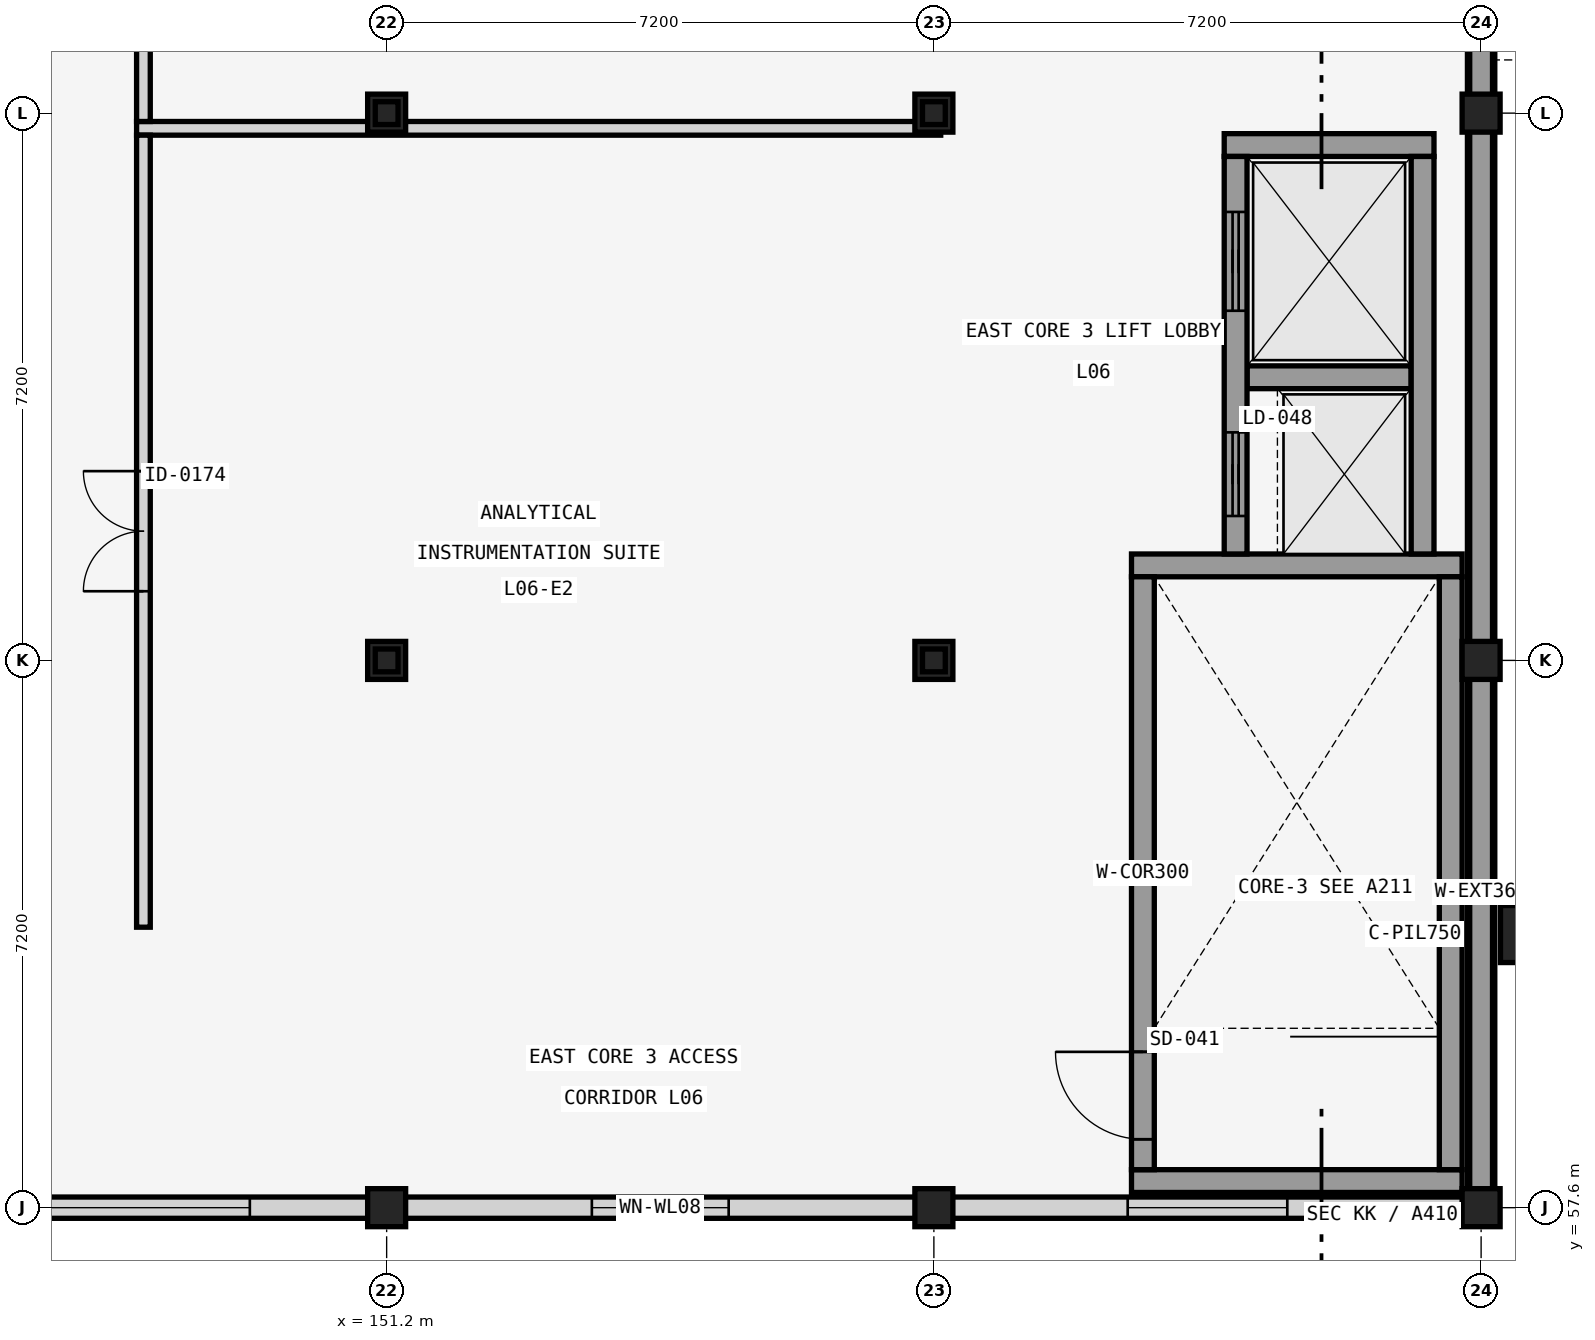
"""IFC4 building model, lengths in metres.
Left out: names, types, materials, properties, quantities, classifications, styles, units other than length and angle.
Written with IfcOpenShell. Run it as: python <this file> out.ifc"""

import sys

from ifc_helpers import new_model, si_unit, direction, frame, frame_2d, origin, origin_2d, place, context, subcontext, project, spatial, polyline, rectangle, i_section, outline, extrude, element, fill, save


model = new_model("IFC4")
c1 = context("Model", 3, precision=1e-05, world=origin(), true_north=direction((0.0, 1.0)))
c2 = subcontext(c1, "Body", "Model", "MODEL_VIEW")
j1 = project(units=[si_unit("LENGTHUNIT", "METRE"), si_unit("PLANEANGLEUNIT", "RADIAN")], contexts=[c1])
p1 = place(None, origin())
s1 = spatial("IfcSite", under=j1, at=p1, CompositionType="ELEMENT")
p2 = place(p1, origin())
s2 = spatial("IfcBuilding", under=s1, at=p2, CompositionType="ELEMENT")
p3 = place(p2, frame((0.0, 0.0, 25.6)))
s3 = spatial("IfcBuildingStorey", under=s2, at=p3, CompositionType="ELEMENT", Elevation=25.6)
for number, where, z_axis, x_axis in (
    (1, (151.2, 57.6, 0.0), (0.0, 0.0, 1.0), (1.0, 0.0, 0.0)),
    (2, (151.2, 64.8, 0.0), (0.0, 0.0, 1.0), (1.0, 0.0, 0.0)),
    (3, (151.2, 72.0, 0.0), (0.0, 0.0, 1.0), (1.0, 0.0, 0.0)),
    (4, (158.4, 57.6, 0.0), (0.0, 0.0, 1.0), (1.0, 0.0, 0.0)),
    (5, (158.4, 64.8, 0.0), (0.0, 0.0, 1.0), (1.0, 0.0, 0.0)),
    (6, (158.4, 72.0, 0.0), (0.0, 0.0, 1.0), (1.0, 0.0, 0.0)),
    (7, (165.6, 57.6, 0.0), (0.0, 0.0, 1.0), (1.0, 0.0, 0.0)),
    (8, (165.6, 64.8, 0.0), (0.0, 0.0, 1.0), (1.0, 0.0, 0.0)),
    (9, (165.6, 72.0, 0.0), (0.0, 0.0, 1.0), (1.0, 0.0, 0.0)),
):
    element("IfcColumn", number, at=place(p3, frame(where, z_axis=z_axis, x_axis=x_axis)), inside=s3, PredefinedType="COLUMN", context=c2, shape_type="SweptSolid", body=[
        extrude(rectangle(XDim=0.5, YDim=0.5, at=origin_2d()), origin(), (0.0, 0.0, 1.0), 4.16),
    ])
p4 = place(p3, frame((166.08, 61.2, 0.0), z_axis=(0.0, 0.0, 1.0), x_axis=(1.0, 0.0, 0.0)))
e10 = element("IfcColumn", 10, at=p4, inside=s3, PredefinedType="PILASTER", context=c2, shape_type="SweptSolid", body=[
    extrude(rectangle(XDim=0.45, YDim=0.75, at=origin_2d()), origin(), (0.0, 0.0, 1.0), 4.16),
])
p5 = place(p3, frame((151.2, 64.8, 4.16), z_axis=(0.0, 0.0, 1.0), x_axis=(1.0, 0.0, 0.0)))
e11 = element("IfcColumn", 11, at=p5, inside=s3, PredefinedType="COLUMN", context=c2, shape_type="SweptSolid", body=[
    extrude(i_section(OverallWidth=0.3, OverallDepth=0.3, WebThickness=0.011, FlangeThickness=0.019, FilletRadius=0.027, at=origin_2d()), origin(), (0.0, 0.0, 1.0), 0.5),
])
p6 = place(p3, frame((151.2, 72.0, 4.16), z_axis=(0.0, 0.0, 1.0), x_axis=(1.0, 0.0, 0.0)))
e12 = element("IfcColumn", 12, at=p6, inside=s3, PredefinedType="COLUMN", context=c2, shape_type="SweptSolid", body=[
    extrude(i_section(OverallWidth=0.3, OverallDepth=0.3, WebThickness=0.011, FlangeThickness=0.019, FilletRadius=0.027, at=origin_2d()), origin(), (0.0, 0.0, 1.0), 1.28),
])
p7 = place(p3, frame((158.4, 64.8, 4.16), z_axis=(0.0, 0.0, 1.0), x_axis=(1.0, 0.0, 0.0)))
e13 = element("IfcColumn", 13, at=p7, inside=s3, PredefinedType="COLUMN", context=c2, shape_type="SweptSolid", body=[
    extrude(i_section(OverallWidth=0.3, OverallDepth=0.3, WebThickness=0.011, FlangeThickness=0.019, FilletRadius=0.027, at=origin_2d()), origin(), (0.0, 0.0, 1.0), 0.5),
])
p8 = place(p3, frame((158.4, 72.0, 4.16), z_axis=(0.0, 0.0, 1.0), x_axis=(1.0, 0.0, 0.0)))
e14 = element("IfcColumn", 14, at=p8, inside=s3, PredefinedType="COLUMN", context=c2, shape_type="SweptSolid", body=[
    extrude(i_section(OverallWidth=0.3, OverallDepth=0.3, WebThickness=0.011, FlangeThickness=0.019, FilletRadius=0.027, at=origin_2d()), origin(), (0.0, 0.0, 1.0), 1.28),
])
for number, where, z_axis, x_axis in (
    (15, (165.6, 57.84, 0.0), (0.0, 0.0, 1.0), (0.0, 1.0, 0.0)),
    (16, (165.6, 65.04, 0.0), (0.0, 0.0, 1.0), (0.0, 1.0, 0.0)),
):
    element("IfcWall", number, at=place(p3, frame(where, z_axis=z_axis, x_axis=x_axis)), inside=s3, PredefinedType="SOLIDWALL", context=c2, shape_type="SweptSolid", body=[
        extrude(rectangle(XDim=6.72, YDim=0.36, at=frame_2d((3.36, 0.0))), origin(), (0.0, 0.0, 1.0), 3.55),
    ])
p9 = place(p3, frame((165.6, 72.24, 0.0), z_axis=(0.0, 0.0, 1.0), x_axis=(0.0, 1.0, 0.0)))
e17 = element("IfcWall", 17, at=p9, inside=s3, PredefinedType="SOLIDWALL", context=c2, shape_type="SweptSolid", body=[
    extrude(rectangle(XDim=6.72, YDim=0.36, at=frame_2d((3.36, 0.0))), origin(), (0.0, 0.0, 1.0), 3.55),
])
p10 = place(p9, frame((2.31, 0.0, 0.68)))
e18 = element("IfcOpeningElement", 18, at=p10, cuts=e17, PredefinedType="OPENING", context=c2, shape_type="SweptSolid", body=[
    extrude(rectangle(XDim=2.1, YDim=1.8, at=frame_2d((1.05, 0.9))), frame((0.0, 0.19, 0.0), z_axis=(0.0, -1.0, 0.0), x_axis=(1.0, 0.0, 0.0)), (0.0, 0.0, 1.0), 0.38),
])
p11 = place(p3, frame((144.24, 57.6, 0.0), z_axis=(0.0, 0.0, 1.0), x_axis=(1.0, 0.0, 0.0)))
e19 = element("IfcWall", 19, at=p11, inside=s3, PredefinedType="SOLIDWALL", context=c2, shape_type="SweptSolid", body=[
    extrude(rectangle(XDim=6.72, YDim=0.28, at=frame_2d((3.36, 0.0))), origin(), (0.0, 0.0, 1.0), 3.55),
])
p12 = place(p11, frame((1.56, 0.0, 0.68)))
e20 = element("IfcOpeningElement", 20, at=p12, cuts=e19, PredefinedType="OPENING", context=c2, shape_type="SweptSolid", body=[
    extrude(rectangle(XDim=3.6, YDim=2.1, at=frame_2d((1.8, 1.05))), frame((0.0, 0.15, 0.0), z_axis=(0.0, -1.0, 0.0), x_axis=(1.0, 0.0, 0.0)), (0.0, 0.0, 1.0), 0.3),
])
p13 = place(p3, frame((151.44, 57.6, 0.0), z_axis=(0.0, 0.0, 1.0), x_axis=(1.0, 0.0, 0.0)))
e21 = element("IfcWall", 21, at=p13, inside=s3, PredefinedType="SOLIDWALL", context=c2, shape_type="SweptSolid", body=[
    extrude(rectangle(XDim=6.72, YDim=0.28, at=frame_2d((3.36, 0.0))), origin(), (0.0, 0.0, 1.0), 3.55),
])
p14 = place(p13, frame((2.46, 0.0, 0.68)))
e22 = element("IfcOpeningElement", 22, at=p14, cuts=e21, PredefinedType="OPENING", context=c2, shape_type="SweptSolid", body=[
    extrude(rectangle(XDim=1.8, YDim=1.8, at=frame_2d((0.9, 0.9))), frame((0.0, 0.15, 0.0), z_axis=(0.0, -1.0, 0.0), x_axis=(1.0, 0.0, 0.0)), (0.0, 0.0, 1.0), 0.3),
])
p15 = place(p3, frame((158.64, 57.6, 0.0), z_axis=(0.0, 0.0, 1.0), x_axis=(1.0, 0.0, 0.0)))
e23 = element("IfcWall", 23, at=p15, inside=s3, PredefinedType="SOLIDWALL", context=c2, shape_type="SweptSolid", body=[
    extrude(rectangle(XDim=6.72, YDim=0.28, at=frame_2d((3.36, 0.0))), origin(), (0.0, 0.0, 1.0), 3.55),
])
p16 = place(p15, frame((2.31, 0.0, 0.68)))
e24 = element("IfcOpeningElement", 24, at=p16, cuts=e23, PredefinedType="OPENING", context=c2, shape_type="SweptSolid", body=[
    extrude(rectangle(XDim=2.1, YDim=1.8, at=frame_2d((1.05, 0.9))), frame((0.0, 0.15, 0.0), z_axis=(0.0, -1.0, 0.0), x_axis=(1.0, 0.0, 0.0)), (0.0, 0.0, 1.0), 0.3),
])
p17 = place(p3, frame((165.6, 57.6, 4.16), z_axis=(0.0, 0.0, 1.0), x_axis=(0.0, 1.0, 0.0)))
e25 = element("IfcWall", 25, at=p17, inside=s3, PredefinedType="SHEAR", context=c2, shape_type="SweptSolid", body=[
    extrude(outline(polyline([(0.0, 0.0), (28.8, 0.0), (28.8, 0.12), (28.76, 3.12), (0.0, 0.12), (0.0, 0.0)])), frame((0.0, 0.15, 0.0), z_axis=(0.0, -1.0, 0.0), x_axis=(1.0, 0.0, 0.0)), (0.0, 0.0, 1.0), 0.3),
])
for number, where, z_axis, x_axis in (
    (26, (161.0, 57.95, 0.0), (0.0, 0.0, 1.0), (1.0, 0.0, 0.0)),
    (27, (161.0, 66.05, 0.0), (0.0, 0.0, 1.0), (1.0, 0.0, 0.0)),
):
    element("IfcWall", number, at=place(p3, frame(where, z_axis=z_axis, x_axis=x_axis)), inside=s3, PredefinedType="SHEAR", context=c2, shape_type="SweptSolid", body=[
        extrude(rectangle(XDim=4.35, YDim=0.3, at=frame_2d((2.175, 0.0))), origin(), (0.0, 0.0, 1.0), 3.81),
    ])
p18 = place(p3, frame((161.15, 58.1, 0.0), z_axis=(0.0, 0.0, 1.0), x_axis=(0.0, 1.0, 0.0)))
e28 = element("IfcWall", 28, at=p18, inside=s3, PredefinedType="SHEAR", context=c2, shape_type="SweptSolid", body=[
    extrude(rectangle(XDim=7.8, YDim=0.3, at=frame_2d((3.9, 0.0))), origin(), (0.0, 0.0, 1.0), 3.81),
])
p19 = place(p18, frame((0.4, 0.0, 0.0)))
e29 = element("IfcOpeningElement", 29, at=p19, cuts=e28, PredefinedType="OPENING", context=c2, shape_type="SweptSolid", body=[
    extrude(rectangle(XDim=1.15, YDim=2.2, at=frame_2d((0.575, 1.1))), frame((0.0, 0.16, 0.0), z_axis=(0.0, -1.0, 0.0), x_axis=(1.0, 0.0, 0.0)), (0.0, 0.0, 1.0), 0.32),
])
p20 = place(p3, frame((165.2, 58.1, 0.0), z_axis=(0.0, 0.0, 1.0), x_axis=(0.0, 1.0, 0.0)))
e30 = element("IfcWall", 30, at=p20, inside=s3, PredefinedType="SHEAR", context=c2, shape_type="SweptSolid", body=[
    extrude(rectangle(XDim=7.8, YDim=0.3, at=frame_2d((3.9, 0.0))), origin(), (0.0, 0.0, 1.0), 3.81),
])
p21 = place(p3, frame((162.22, 71.58, 0.0), z_axis=(0.0, 0.0, 1.0), x_axis=(1.0, 0.0, 0.0)))
e31 = element("IfcWall", 31, at=p21, inside=s3, PredefinedType="SHEAR", context=c2, shape_type="SweptSolid", body=[
    extrude(rectangle(XDim=2.76, YDim=0.3, at=frame_2d((1.38, 0.0))), origin(), (0.0, 0.0, 1.0), 3.81),
])
p22 = place(p3, frame((162.52, 68.525, 0.0), z_axis=(0.0, 0.0, 1.0), x_axis=(1.0, 0.0, 0.0)))
e32 = element("IfcWall", 32, at=p22, inside=s3, PredefinedType="SHEAR", context=c2, shape_type="SweptSolid", body=[
    extrude(rectangle(XDim=2.16, YDim=0.3, at=frame_2d((1.08, 0.0))), origin(), (0.0, 0.0, 1.0), 3.81),
])
p23 = place(p3, frame((162.37, 66.2, 0.0), z_axis=(0.0, 0.0, 1.0), x_axis=(0.0, 1.0, 0.0)))
e33 = element("IfcWall", 33, at=p23, inside=s3, PredefinedType="SHEAR", context=c2, shape_type="SweptSolid", body=[
    extrude(rectangle(XDim=5.23, YDim=0.3, at=frame_2d((2.615, 0.0))), origin(), (0.0, 0.0, 1.0), 3.81),
])
p24 = place(p23, frame((0.5, 0.0, 0.0)))
e34 = element("IfcOpeningElement", 34, at=p24, cuts=e33, PredefinedType="OPENING", context=c2, shape_type="SweptSolid", body=[
    extrude(rectangle(XDim=1.1, YDim=2.2, at=frame_2d((0.55, 1.1))), frame((0.0, 0.16, 0.0), z_axis=(0.0, -1.0, 0.0), x_axis=(1.0, 0.0, 0.0)), (0.0, 0.0, 1.0), 0.32),
])
p25 = place(p23, frame((3.2, 0.0, 0.0)))
e35 = element("IfcOpeningElement", 35, at=p25, cuts=e33, PredefinedType="OPENING", context=c2, shape_type="SweptSolid", body=[
    extrude(rectangle(XDim=1.3, YDim=2.2, at=frame_2d((0.65, 1.1))), frame((0.0, 0.16, 0.0), z_axis=(0.0, -1.0, 0.0), x_axis=(1.0, 0.0, 0.0)), (0.0, 0.0, 1.0), 0.32),
])
p26 = place(p3, frame((164.83, 66.2, 0.0), z_axis=(0.0, 0.0, 1.0), x_axis=(0.0, 1.0, 0.0)))
e36 = element("IfcWall", 36, at=p26, inside=s3, PredefinedType="SHEAR", context=c2, shape_type="SweptSolid", body=[
    extrude(rectangle(XDim=5.23, YDim=0.3, at=frame_2d((2.615, 0.0))), origin(), (0.0, 0.0, 1.0), 3.81),
])
p27 = place(p3, frame((147.91, 71.8, 0.0), z_axis=(0.0, 0.0, 1.0), x_axis=(1.0, 0.0, 0.0)))
e37 = element("IfcWall", 37, at=p27, inside=s3, PredefinedType="PARTITIONING", context=c2, shape_type="SweptSolid", body=[
    extrude(rectangle(XDim=10.58, YDim=0.18, at=frame_2d((5.29, 0.0))), origin(), (0.0, 0.0, 1.0), 3.81),
])
p28 = place(p3, frame((148.0, 61.29, 0.0), z_axis=(0.0, 0.0, 1.0), x_axis=(0.0, 1.0, 0.0)))
e38 = element("IfcWall", 38, at=p28, inside=s3, PredefinedType="PARTITIONING", context=c2, shape_type="SweptSolid", body=[
    extrude(rectangle(XDim=10.42, YDim=0.18, at=frame_2d((5.21, 0.0))), origin(), (0.0, 0.0, 1.0), 3.81),
])
p29 = place(p28, frame((4.42, 0.0, 0.0)))
e39 = element("IfcOpeningElement", 39, at=p29, cuts=e38, PredefinedType="OPENING", context=c2, shape_type="SweptSolid", body=[
    extrude(rectangle(XDim=1.58, YDim=2.22, at=frame_2d((0.79, 1.11))), frame((0.0, 0.1, 0.0), z_axis=(0.0, -1.0, 0.0), x_axis=(1.0, 0.0, 0.0)), (0.0, 0.0, 1.0), 0.2),
])
p30 = place(p3, frame((148.0, 71.89, 0.0), z_axis=(0.0, 0.0, 1.0), x_axis=(0.0, 1.0, 0.0)))
e40 = element("IfcWall", 40, at=p30, inside=s3, PredefinedType="PARTITIONING", context=c2, shape_type="SweptSolid", body=[
    extrude(rectangle(XDim=14.38, YDim=0.18, at=frame_2d((7.19, 0.0))), origin(), (0.0, 0.0, 1.0), 3.81),
])
p31 = place(p30, frame((6.375, 0.0, 0.0)))
e41 = element("IfcOpeningElement", 41, at=p31, cuts=e40, PredefinedType="OPENING", context=c2, shape_type="SweptSolid", body=[
    extrude(rectangle(XDim=1.63, YDim=2.22, at=frame_2d((0.815, 1.11))), frame((0.0, 0.1, 0.0), z_axis=(0.0, -1.0, 0.0), x_axis=(1.0, 0.0, 0.0)), (0.0, 0.0, 1.0), 0.2),
])
p32 = place(p12, origin())
e42 = element("IfcWindow", 42, at=p32, inside=s3, PartitioningType="SINGLE_PANEL", PredefinedType="WINDOW", context=c2, shape_type="SweptSolid", body=[
    extrude(rectangle(XDim=3.6, YDim=2.1, at=frame_2d((1.8, 1.05))), frame((0.0, 0.03, 0.0), z_axis=(0.0, -1.0, 0.0), x_axis=(1.0, 0.0, 0.0)), (0.0, 0.0, 1.0), 0.06),
])
fill(e20, e42)
p33 = place(p14, origin())
e43 = element("IfcWindow", 43, at=p33, inside=s3, PartitioningType="SINGLE_PANEL", PredefinedType="WINDOW", context=c2, shape_type="SweptSolid", body=[
    extrude(rectangle(XDim=1.8, YDim=1.8, at=frame_2d((0.9, 0.9))), frame((0.0, 0.03, 0.0), z_axis=(0.0, -1.0, 0.0), x_axis=(1.0, 0.0, 0.0)), (0.0, 0.0, 1.0), 0.06),
])
fill(e22, e43)
p34 = place(p16, origin())
e44 = element("IfcWindow", 44, at=p34, inside=s3, PartitioningType="SINGLE_PANEL", PredefinedType="WINDOW", context=c2, shape_type="SweptSolid", body=[
    extrude(rectangle(XDim=2.1, YDim=1.8, at=frame_2d((1.05, 0.9))), frame((0.0, 0.03, 0.0), z_axis=(0.0, -1.0, 0.0), x_axis=(1.0, 0.0, 0.0)), (0.0, 0.0, 1.0), 0.06),
])
fill(e24, e44)
p35 = place(p19, frame((1.15, 0.0, 0.0), z_axis=(0.0, 0.0, 1.0), x_axis=(-1.0, 0.0, 0.0)))
e45 = element("IfcDoor", 45, at=p35, inside=s3, OperationType="SINGLE_SWING_RIGHT", PredefinedType="DOOR", context=c2, shape_type="SweptSolid", body=[
    extrude(rectangle(XDim=1.15, YDim=2.2, at=frame_2d((0.575, 1.1))), frame((0.0, 0.025, 0.0), z_axis=(0.0, -1.0, 0.0), x_axis=(1.0, 0.0, 0.0)), (0.0, 0.0, 1.0), 0.05),
])
fill(e29, e45)
p36 = place(p24, origin())
e46 = element("IfcDoor", 46, at=p36, inside=s3, OperationType="SLIDING_TO_LEFT", PredefinedType="DOOR", context=c2, shape_type="SweptSolid", body=[
    extrude(rectangle(XDim=1.1, YDim=2.2, at=frame_2d((0.55, 1.1))), frame((0.0, 0.025, 0.0), z_axis=(0.0, -1.0, 0.0), x_axis=(1.0, 0.0, 0.0)), (0.0, 0.0, 1.0), 0.05),
])
fill(e34, e46)
p37 = place(p25, origin())
e47 = element("IfcDoor", 47, at=p37, inside=s3, OperationType="SLIDING_TO_LEFT", PredefinedType="DOOR", context=c2, shape_type="SweptSolid", body=[
    extrude(rectangle(XDim=1.3, YDim=2.2, at=frame_2d((0.65, 1.1))), frame((0.0, 0.025, 0.0), z_axis=(0.0, -1.0, 0.0), x_axis=(1.0, 0.0, 0.0)), (0.0, 0.0, 1.0), 0.05),
])
fill(e35, e47)
p38 = place(p29, origin())
e48 = element("IfcDoor", 48, at=p38, inside=s3, OperationType="DOUBLE_DOOR_SINGLE_SWING", PredefinedType="DOOR", context=c2, shape_type="SweptSolid", body=[
    extrude(rectangle(XDim=1.58, YDim=2.22, at=frame_2d((0.79, 1.11))), frame((0.0, 0.025, 0.0), z_axis=(0.0, -1.0, 0.0), x_axis=(1.0, 0.0, 0.0)), (0.0, 0.0, 1.0), 0.05),
])
fill(e39, e48)
save(model, sys.argv[1])
